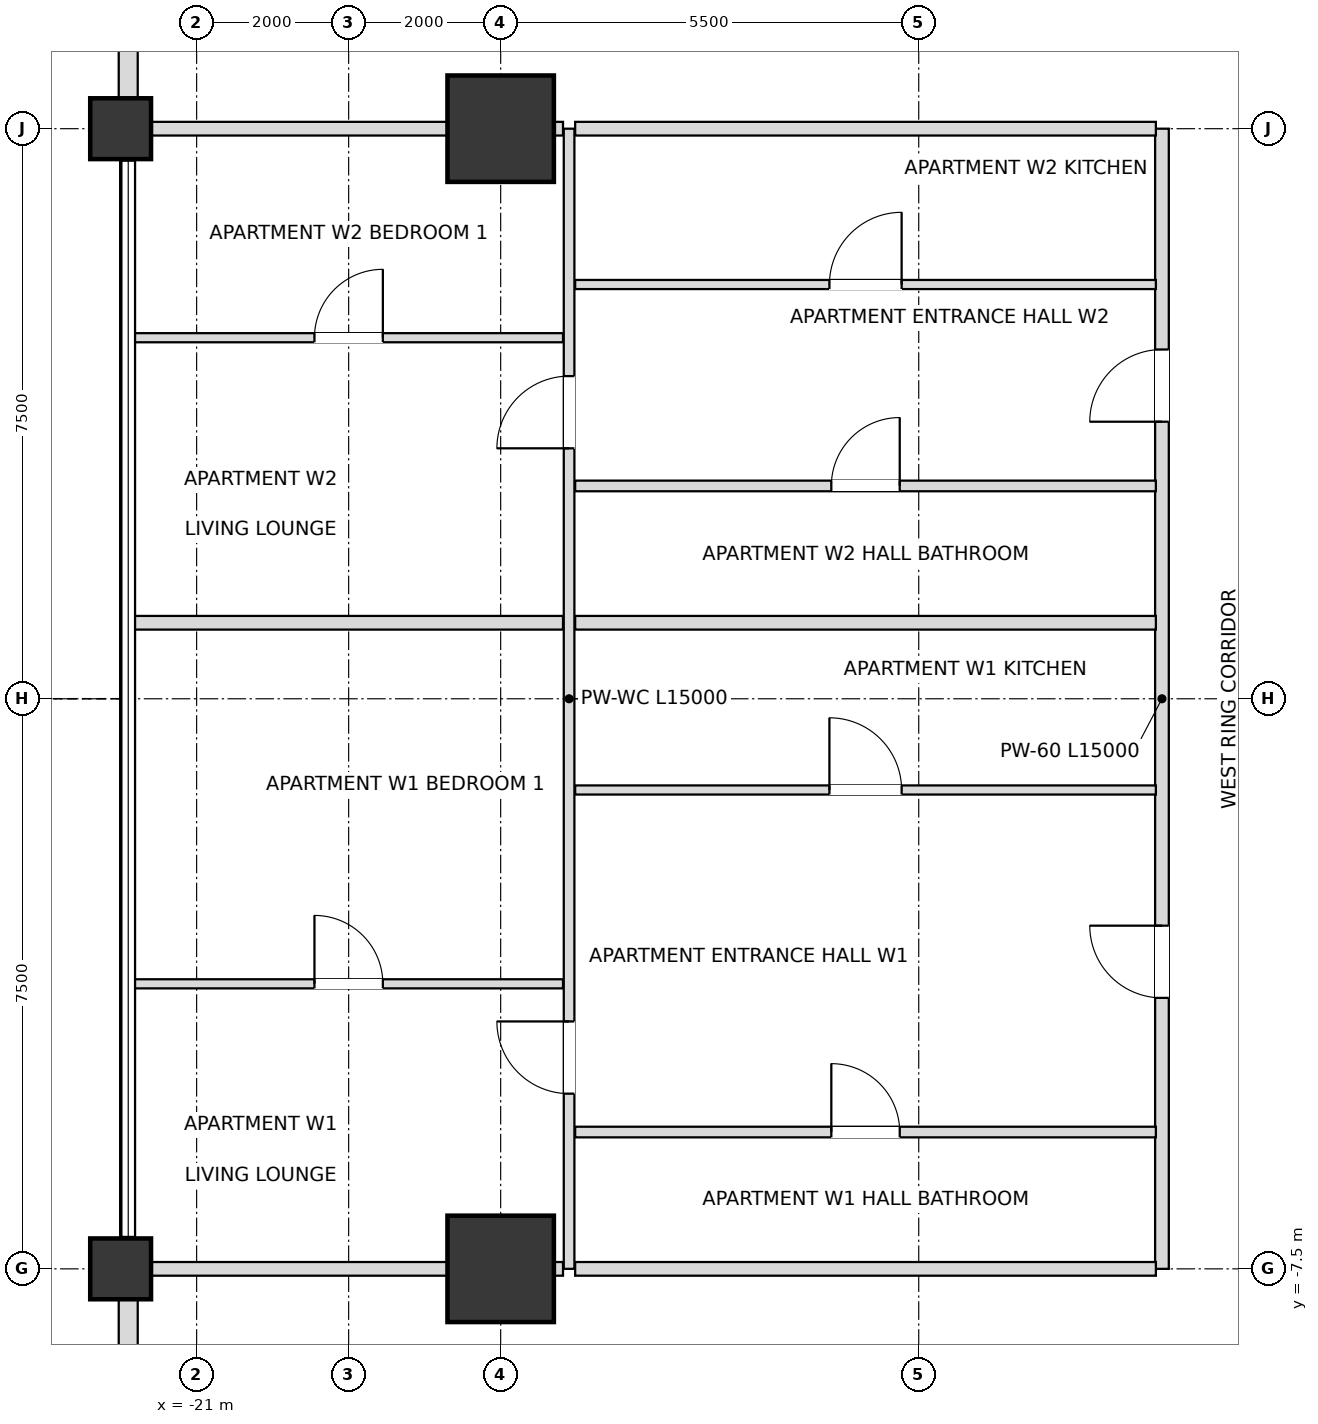
"""IFC4 building model, lengths in metres.
Left out: names, types, materials, properties, quantities, classifications, styles, units other than length and angle.
Written with IfcOpenShell. Run it as: python <this file> out.ifc"""

import sys

from ifc_helpers import new_model, si_unit, direction, frame, frame_2d, origin, origin_2d, place, context, subcontext, project, spatial, rectangle, extrude, element, fill, save


model = new_model("IFC4")
c1 = context("Model", 3, precision=1e-05, world=origin(), true_north=direction((0.0, 1.0)))
c2 = subcontext(c1, "Body", "Model", "MODEL_VIEW")
j1 = project(units=[si_unit("LENGTHUNIT", "METRE"), si_unit("PLANEANGLEUNIT", "RADIAN")], contexts=[c1])
p1 = place(None, origin())
s1 = spatial("IfcSite", under=j1, at=p1, CompositionType="ELEMENT")
p2 = place(p1, origin())
s2 = spatial("IfcBuilding", under=s1, at=p2, CompositionType="ELEMENT")
p3 = place(p2, frame((0.0, 0.0, 50.4)))
s3 = spatial("IfcBuildingStorey", under=s2, at=p3, CompositionType="ELEMENT", Elevation=50.4)
for number, where, z_axis, x_axis in (
    (1, (-17.0, 7.5, 0.0), (0.0, 0.0, 1.0), (1.0, 0.0, 0.0)),
    (2, (-17.0, -7.5, 0.0), (0.0, 0.0, 1.0), (1.0, 0.0, 0.0)),
):
    element("IfcColumn", number, at=place(p3, frame(where, z_axis=z_axis, x_axis=x_axis)), inside=s3, PredefinedType="USERDEFINED", context=c2, shape_type="SweptSolid", body=[
        extrude(rectangle(XDim=1.4, YDim=1.4, at=origin_2d()), origin(), (0.0, 0.0, 1.0), 3.6),
    ])
for number, where, z_axis, x_axis in (
    (3, (-22.0, -7.5, 0.0), (0.0, 0.0, 1.0), (1.0, 0.0, 0.0)),
    (4, (-22.0, 7.5, 0.0), (0.0, 0.0, 1.0), (1.0, 0.0, 0.0)),
):
    element("IfcColumn", number, at=place(p3, frame(where, z_axis=z_axis, x_axis=x_axis)), inside=s3, PredefinedType="COLUMN", context=c2, shape_type="SweptSolid", body=[
        extrude(rectangle(XDim=0.8, YDim=0.8, at=origin_2d()), origin(), (0.0, 0.0, 1.0), 3.6),
    ])
p4 = place(p3, frame((-21.9, 12.605, 0.0), z_axis=(0.0, 0.0, 1.0), x_axis=(0.0, -1.0, 0.0)))
e5 = element("IfcWall", 5, at=p4, inside=s3, PredefinedType="SOLIDWALL", context=c2, shape_type="SweptSolid", body=[
    extrude(rectangle(XDim=4.71, YDim=0.25, at=frame_2d((2.355, 0.0))), origin(), (0.0, 0.0, 1.0), 2.736),
])
p5 = place(p4, frame((1.455, 0.0, 0.72)))
e6 = element("IfcOpeningElement", 6, at=p5, cuts=e5, PredefinedType="OPENING", context=c2, shape_type="SweptSolid", body=[
    extrude(rectangle(XDim=1.8, YDim=1.68, at=frame_2d((0.9, 0.84))), frame((0.0, 0.135, 0.0), z_axis=(0.0, -1.0, 0.0), x_axis=(1.0, 0.0, 0.0)), (0.0, 0.0, 1.0), 0.27),
])
p6 = place(p3, frame((-21.9, -7.895, 0.0), z_axis=(0.0, 0.0, 1.0), x_axis=(0.0, -1.0, 0.0)))
e7 = element("IfcWall", 7, at=p6, inside=s3, PredefinedType="SOLIDWALL", context=c2, shape_type="SweptSolid", body=[
    extrude(rectangle(XDim=4.71, YDim=0.25, at=frame_2d((2.355, 0.0))), origin(), (0.0, 0.0, 1.0), 2.736),
])
p7 = place(p6, frame((1.455, 0.0, 0.72)))
e8 = element("IfcOpeningElement", 8, at=p7, cuts=e7, PredefinedType="OPENING", context=c2, shape_type="SweptSolid", body=[
    extrude(rectangle(XDim=1.8, YDim=1.68, at=frame_2d((0.9, 0.84))), frame((0.0, 0.135, 0.0), z_axis=(0.0, -1.0, 0.0), x_axis=(1.0, 0.0, 0.0)), (0.0, 0.0, 1.0), 0.27),
])
p8 = place(p3, frame((-16.1, -7.5, 0.0), z_axis=(0.0, 0.0, 1.0), x_axis=(0.0, 1.0, 0.0)))
e9 = element("IfcWall", 9, at=p8, inside=s3, PredefinedType="PARTITIONING", context=c2, shape_type="SweptSolid", body=[
    extrude(rectangle(XDim=15.0, YDim=0.14, at=frame_2d((7.5, 0.0))), origin(), (0.0, 0.0, 1.0), 3.38),
])
p9 = place(p8, frame((2.305, 0.0, 0.0)))
e10 = element("IfcOpeningElement", 10, at=p9, cuts=e9, PredefinedType="OPENING", context=c2, shape_type="SweptSolid", body=[
    extrude(rectangle(XDim=0.95, YDim=2.1, at=frame_2d((0.475, 1.05))), frame((0.0, 0.08, 0.0), z_axis=(0.0, -1.0, 0.0), x_axis=(1.0, 0.0, 0.0)), (0.0, 0.0, 1.0), 0.16),
])
p10 = place(p8, frame((10.795, 0.0, 0.0)))
e11 = element("IfcOpeningElement", 11, at=p10, cuts=e9, PredefinedType="OPENING", context=c2, shape_type="SweptSolid", body=[
    extrude(rectangle(XDim=0.95, YDim=2.1, at=frame_2d((0.475, 1.05))), frame((0.0, 0.08, 0.0), z_axis=(0.0, -1.0, 0.0), x_axis=(1.0, 0.0, 0.0)), (0.0, 0.0, 1.0), 0.16),
])
p11 = place(p3, frame((-8.3, -7.5, 0.0), z_axis=(0.0, 0.0, 1.0), x_axis=(0.0, 1.0, 0.0)))
e12 = element("IfcWall", 12, at=p11, inside=s3, PredefinedType="PARTITIONING", context=c2, shape_type="SweptSolid", body=[
    extrude(rectangle(XDim=15.0, YDim=0.18, at=frame_2d((7.5, 0.0))), origin(), (0.0, 0.0, 1.0), 3.38),
])
p12 = place(p11, frame((3.565, 0.0, 0.0)))
e13 = element("IfcOpeningElement", 13, at=p12, cuts=e12, PredefinedType="OPENING", context=c2, shape_type="SweptSolid", body=[
    extrude(rectangle(XDim=0.95, YDim=2.15, at=frame_2d((0.475, 1.075))), frame((0.0, 0.1, 0.0), z_axis=(0.0, -1.0, 0.0), x_axis=(1.0, 0.0, 0.0)), (0.0, 0.0, 1.0), 0.2),
])
p13 = place(p11, frame((11.145, 0.0, 0.0)))
e14 = element("IfcOpeningElement", 14, at=p13, cuts=e12, PredefinedType="OPENING", context=c2, shape_type="SweptSolid", body=[
    extrude(rectangle(XDim=0.95, YDim=2.15, at=frame_2d((0.475, 1.075))), frame((0.0, 0.1, 0.0), z_axis=(0.0, -1.0, 0.0), x_axis=(1.0, 0.0, 0.0)), (0.0, 0.0, 1.0), 0.2),
])
p14 = place(p3, frame((-21.9, -7.5, 0.0), z_axis=(0.0, 0.0, 1.0), x_axis=(1.0, 0.0, 0.0)))
e15 = element("IfcWall", 15, at=p14, inside=s3, PredefinedType="PARTITIONING", context=c2, shape_type="SweptSolid", body=[
    extrude(rectangle(XDim=5.72, YDim=0.18, at=frame_2d((2.86, 0.0))), origin(), (0.0, 0.0, 1.0), 2.816),
])
p15 = place(p3, frame((-16.02, -7.5, 0.0), z_axis=(0.0, 0.0, 1.0), x_axis=(1.0, 0.0, 0.0)))
e16 = element("IfcWall", 16, at=p15, inside=s3, PredefinedType="PARTITIONING", context=c2, shape_type="SweptSolid", body=[
    extrude(rectangle(XDim=7.64, YDim=0.18, at=frame_2d((3.82, 0.0))), origin(), (0.0, 0.0, 1.0), 2.816),
])
p16 = place(p3, frame((-16.02, -5.7, 0.0), z_axis=(0.0, 0.0, 1.0), x_axis=(1.0, 0.0, 0.0)))
e17 = element("IfcWall", 17, at=p16, inside=s3, PredefinedType="PARTITIONING", context=c2, shape_type="SweptSolid", body=[
    extrude(rectangle(XDim=7.64, YDim=0.14, at=frame_2d((3.82, 0.0))), origin(), (0.0, 0.0, 1.0), 2.948),
])
p17 = place(p16, frame((3.37, 0.0, 0.0)))
e18 = element("IfcOpeningElement", 18, at=p17, cuts=e17, PredefinedType="OPENING", context=c2, shape_type="SweptSolid", body=[
    extrude(rectangle(XDim=0.9, YDim=2.1, at=frame_2d((0.45, 1.05))), frame((0.0, 0.08, 0.0), z_axis=(0.0, -1.0, 0.0), x_axis=(1.0, 0.0, 0.0)), (0.0, 0.0, 1.0), 0.16),
])
p18 = place(p3, frame((-21.82, -3.75, 0.0), z_axis=(0.0, 0.0, 1.0), x_axis=(1.0, 0.0, 0.0)))
e19 = element("IfcWall", 19, at=p18, inside=s3, PredefinedType="PARTITIONING", context=c2, shape_type="SweptSolid", body=[
    extrude(rectangle(XDim=5.64, YDim=0.12, at=frame_2d((2.82, 0.0))), origin(), (0.0, 0.0, 1.0), 2.816),
])
p19 = place(p18, frame((2.37, 0.0, 0.0)))
e20 = element("IfcOpeningElement", 20, at=p19, cuts=e19, PredefinedType="OPENING", context=c2, shape_type="SweptSolid", body=[
    extrude(rectangle(XDim=0.9, YDim=2.1, at=frame_2d((0.45, 1.05))), frame((0.0, 0.07, 0.0), z_axis=(0.0, -1.0, 0.0), x_axis=(1.0, 0.0, 0.0)), (0.0, 0.0, 1.0), 0.14),
])
p20 = place(p3, frame((-16.02, -1.2, 0.0), z_axis=(0.0, 0.0, 1.0), x_axis=(1.0, 0.0, 0.0)))
e21 = element("IfcWall", 21, at=p20, inside=s3, PredefinedType="PARTITIONING", context=c2, shape_type="SweptSolid", body=[
    extrude(rectangle(XDim=7.64, YDim=0.12, at=frame_2d((3.82, 0.0))), origin(), (0.0, 0.0, 1.0), 2.948),
])
p21 = place(p20, frame((3.345, 0.0, 0.0)))
e22 = element("IfcOpeningElement", 22, at=p21, cuts=e21, PredefinedType="OPENING", context=c2, shape_type="SweptSolid", body=[
    extrude(rectangle(XDim=0.95, YDim=2.1, at=frame_2d((0.475, 1.05))), frame((0.0, 0.07, 0.0), z_axis=(0.0, -1.0, 0.0), x_axis=(1.0, 0.0, 0.0)), (0.0, 0.0, 1.0), 0.14),
])
p22 = place(p3, frame((-21.82, 1.0, 0.0), z_axis=(0.0, 0.0, 1.0), x_axis=(1.0, 0.0, 0.0)))
e23 = element("IfcWall", 23, at=p22, inside=s3, PredefinedType="PARTITIONING", context=c2, shape_type="SweptSolid", body=[
    extrude(rectangle(XDim=5.64, YDim=0.18, at=frame_2d((2.82, 0.0))), origin(), (0.0, 0.0, 1.0), 2.816),
])
p23 = place(p3, frame((-16.02, 1.0, 0.0), z_axis=(0.0, 0.0, 1.0), x_axis=(1.0, 0.0, 0.0)))
e24 = element("IfcWall", 24, at=p23, inside=s3, PredefinedType="PARTITIONING", context=c2, shape_type="SweptSolid", body=[
    extrude(rectangle(XDim=7.64, YDim=0.18, at=frame_2d((3.82, 0.0))), origin(), (0.0, 0.0, 1.0), 2.948),
])
p24 = place(p3, frame((-16.02, 2.8, 0.0), z_axis=(0.0, 0.0, 1.0), x_axis=(1.0, 0.0, 0.0)))
e25 = element("IfcWall", 25, at=p24, inside=s3, PredefinedType="PARTITIONING", context=c2, shape_type="SweptSolid", body=[
    extrude(rectangle(XDim=7.64, YDim=0.14, at=frame_2d((3.82, 0.0))), origin(), (0.0, 0.0, 1.0), 2.948),
])
p25 = place(p24, frame((3.37, 0.0, 0.0)))
e26 = element("IfcOpeningElement", 26, at=p25, cuts=e25, PredefinedType="OPENING", context=c2, shape_type="SweptSolid", body=[
    extrude(rectangle(XDim=0.9, YDim=2.1, at=frame_2d((0.45, 1.05))), frame((0.0, 0.08, 0.0), z_axis=(0.0, -1.0, 0.0), x_axis=(1.0, 0.0, 0.0)), (0.0, 0.0, 1.0), 0.16),
])
p26 = place(p3, frame((-21.82, 4.75, 0.0), z_axis=(0.0, 0.0, 1.0), x_axis=(1.0, 0.0, 0.0)))
e27 = element("IfcWall", 27, at=p26, inside=s3, PredefinedType="PARTITIONING", context=c2, shape_type="SweptSolid", body=[
    extrude(rectangle(XDim=5.64, YDim=0.12, at=frame_2d((2.82, 0.0))), origin(), (0.0, 0.0, 1.0), 2.816),
])
p27 = place(p26, frame((2.37, 0.0, 0.0)))
e28 = element("IfcOpeningElement", 28, at=p27, cuts=e27, PredefinedType="OPENING", context=c2, shape_type="SweptSolid", body=[
    extrude(rectangle(XDim=0.9, YDim=2.1, at=frame_2d((0.45, 1.05))), frame((0.0, 0.07, 0.0), z_axis=(0.0, -1.0, 0.0), x_axis=(1.0, 0.0, 0.0)), (0.0, 0.0, 1.0), 0.14),
])
p28 = place(p3, frame((-16.02, 5.45, 0.0), z_axis=(0.0, 0.0, 1.0), x_axis=(1.0, 0.0, 0.0)))
e29 = element("IfcWall", 29, at=p28, inside=s3, PredefinedType="PARTITIONING", context=c2, shape_type="SweptSolid", body=[
    extrude(rectangle(XDim=7.64, YDim=0.12, at=frame_2d((3.82, 0.0))), origin(), (0.0, 0.0, 1.0), 2.948),
])
p29 = place(p28, frame((3.345, 0.0, 0.0)))
e30 = element("IfcOpeningElement", 30, at=p29, cuts=e29, PredefinedType="OPENING", context=c2, shape_type="SweptSolid", body=[
    extrude(rectangle(XDim=0.95, YDim=2.1, at=frame_2d((0.475, 1.05))), frame((0.0, 0.07, 0.0), z_axis=(0.0, -1.0, 0.0), x_axis=(1.0, 0.0, 0.0)), (0.0, 0.0, 1.0), 0.14),
])
p30 = place(p3, frame((-21.9, 7.5, 0.0), z_axis=(0.0, 0.0, 1.0), x_axis=(1.0, 0.0, 0.0)))
e31 = element("IfcWall", 31, at=p30, inside=s3, PredefinedType="PARTITIONING", context=c2, shape_type="SweptSolid", body=[
    extrude(rectangle(XDim=5.72, YDim=0.18, at=frame_2d((2.86, 0.0))), origin(), (0.0, 0.0, 1.0), 2.816),
])
p31 = place(p3, frame((-16.02, 7.5, 0.0), z_axis=(0.0, 0.0, 1.0), x_axis=(1.0, 0.0, 0.0)))
e32 = element("IfcWall", 32, at=p31, inside=s3, PredefinedType="PARTITIONING", context=c2, shape_type="SweptSolid", body=[
    extrude(rectangle(XDim=7.64, YDim=0.18, at=frame_2d((3.82, 0.0))), origin(), (0.0, 0.0, 1.0), 2.816),
])
p32 = place(p17, origin())
e33 = element("IfcDoor", 33, at=p32, inside=s3, OperationType="SINGLE_SWING_LEFT", PredefinedType="DOOR", context=c2, shape_type="SweptSolid", body=[
    extrude(rectangle(XDim=0.9, YDim=2.1, at=frame_2d((0.45, 1.05))), frame((0.0, 0.025, 0.0), z_axis=(0.0, -1.0, 0.0), x_axis=(1.0, 0.0, 0.0)), (0.0, 0.0, 1.0), 0.05),
])
fill(e18, e33)
p33 = place(p12, origin())
e34 = element("IfcDoor", 34, at=p33, inside=s3, OperationType="SINGLE_SWING_RIGHT", PredefinedType="DOOR", context=c2, shape_type="SweptSolid", body=[
    extrude(rectangle(XDim=0.95, YDim=2.15, at=frame_2d((0.475, 1.075))), frame((0.0, 0.025, 0.0), z_axis=(0.0, -1.0, 0.0), x_axis=(1.0, 0.0, 0.0)), (0.0, 0.0, 1.0), 0.05),
])
fill(e13, e34)
p34 = place(p21, origin())
e35 = element("IfcDoor", 35, at=p34, inside=s3, OperationType="SINGLE_SWING_LEFT", PredefinedType="DOOR", context=c2, shape_type="SweptSolid", body=[
    extrude(rectangle(XDim=0.95, YDim=2.1, at=frame_2d((0.475, 1.05))), frame((0.0, 0.025, 0.0), z_axis=(0.0, -1.0, 0.0), x_axis=(1.0, 0.0, 0.0)), (0.0, 0.0, 1.0), 0.05),
])
fill(e22, e35)
p35 = place(p9, origin())
e36 = element("IfcDoor", 36, at=p35, inside=s3, OperationType="SINGLE_SWING_RIGHT", PredefinedType="DOOR", context=c2, shape_type="SweptSolid", body=[
    extrude(rectangle(XDim=0.95, YDim=2.1, at=frame_2d((0.475, 1.05))), frame((0.0, 0.025, 0.0), z_axis=(0.0, -1.0, 0.0), x_axis=(1.0, 0.0, 0.0)), (0.0, 0.0, 1.0), 0.05),
])
fill(e10, e36)
p36 = place(p19, origin())
e37 = element("IfcDoor", 37, at=p36, inside=s3, OperationType="SINGLE_SWING_LEFT", PredefinedType="DOOR", context=c2, shape_type="SweptSolid", body=[
    extrude(rectangle(XDim=0.9, YDim=2.1, at=frame_2d((0.45, 1.05))), frame((0.0, 0.025, 0.0), z_axis=(0.0, -1.0, 0.0), x_axis=(1.0, 0.0, 0.0)), (0.0, 0.0, 1.0), 0.05),
])
fill(e20, e37)
p37 = place(p25, origin())
e38 = element("IfcDoor", 38, at=p37, inside=s3, OperationType="SINGLE_SWING_RIGHT", PredefinedType="DOOR", context=c2, shape_type="SweptSolid", body=[
    extrude(rectangle(XDim=0.9, YDim=2.1, at=frame_2d((0.45, 1.05))), frame((0.0, 0.025, 0.0), z_axis=(0.0, -1.0, 0.0), x_axis=(1.0, 0.0, 0.0)), (0.0, 0.0, 1.0), 0.05),
])
fill(e26, e38)
p38 = place(p13, origin())
e39 = element("IfcDoor", 39, at=p38, inside=s3, OperationType="SINGLE_SWING_LEFT", PredefinedType="DOOR", context=c2, shape_type="SweptSolid", body=[
    extrude(rectangle(XDim=0.95, YDim=2.15, at=frame_2d((0.475, 1.075))), frame((0.0, 0.025, 0.0), z_axis=(0.0, -1.0, 0.0), x_axis=(1.0, 0.0, 0.0)), (0.0, 0.0, 1.0), 0.05),
])
fill(e14, e39)
p39 = place(p29, origin())
e40 = element("IfcDoor", 40, at=p39, inside=s3, OperationType="SINGLE_SWING_RIGHT", PredefinedType="DOOR", context=c2, shape_type="SweptSolid", body=[
    extrude(rectangle(XDim=0.95, YDim=2.1, at=frame_2d((0.475, 1.05))), frame((0.0, 0.025, 0.0), z_axis=(0.0, -1.0, 0.0), x_axis=(1.0, 0.0, 0.0)), (0.0, 0.0, 1.0), 0.05),
])
fill(e30, e40)
p40 = place(p10, origin())
e41 = element("IfcDoor", 41, at=p40, inside=s3, OperationType="SINGLE_SWING_LEFT", PredefinedType="DOOR", context=c2, shape_type="SweptSolid", body=[
    extrude(rectangle(XDim=0.95, YDim=2.1, at=frame_2d((0.475, 1.05))), frame((0.0, 0.025, 0.0), z_axis=(0.0, -1.0, 0.0), x_axis=(1.0, 0.0, 0.0)), (0.0, 0.0, 1.0), 0.05),
])
fill(e11, e41)
p41 = place(p27, origin())
e42 = element("IfcDoor", 42, at=p41, inside=s3, OperationType="SINGLE_SWING_RIGHT", PredefinedType="DOOR", context=c2, shape_type="SweptSolid", body=[
    extrude(rectangle(XDim=0.9, YDim=2.1, at=frame_2d((0.45, 1.05))), frame((0.0, 0.025, 0.0), z_axis=(0.0, -1.0, 0.0), x_axis=(1.0, 0.0, 0.0)), (0.0, 0.0, 1.0), 0.05),
])
fill(e28, e42)
save(model, sys.argv[1])
